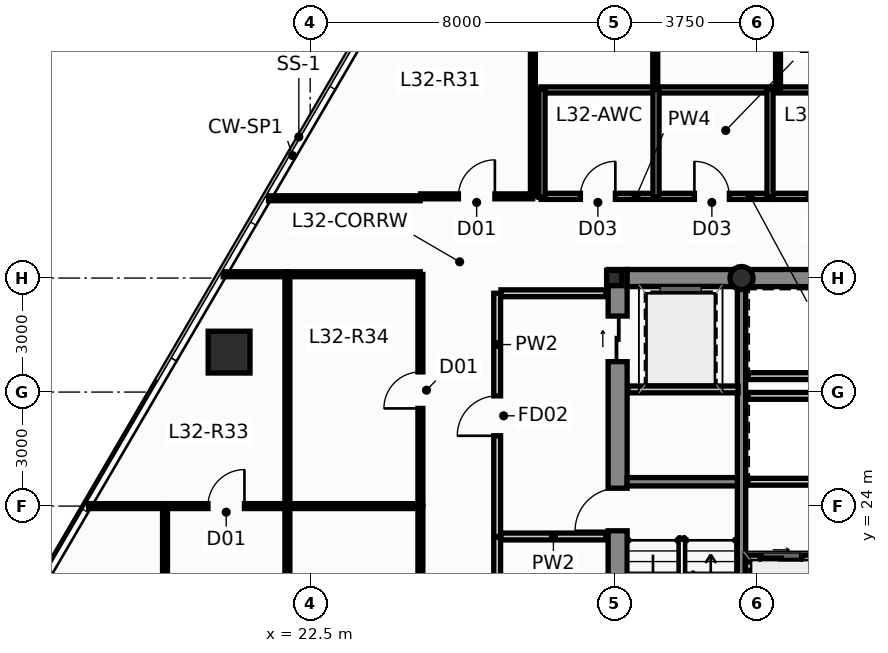
"""IFC4 building model, lengths in metres.
Left out: names, types, materials, properties, quantities, classifications, styles, units other than length and angle.
Written with IfcOpenShell. Run it as: python <this file> out.ifc"""

import sys

from ifc_helpers import new_model, si_unit, direction, frame, frame_2d, origin, origin_2d, place, context, subcontext, project, spatial, rectangle, hollow_rectangle, hollow_circle, i_section, extrude, source, transform, mapped, element, fill, save


model = new_model("IFC4")
c1 = context("Model", 3, precision=1e-05, world=origin(), true_north=direction((0.0, 1.0)))
c2 = subcontext(c1, "Body", "Model", "MODEL_VIEW")
j1 = project(units=[si_unit("LENGTHUNIT", "METRE"), si_unit("PLANEANGLEUNIT", "RADIAN")], contexts=[c1])
p1 = place(None, origin())
s1 = spatial("IfcSite", under=j1, at=p1, CompositionType="ELEMENT")
p2 = place(p1, origin())
s2 = spatial("IfcBuilding", under=s1, at=p2, CompositionType="ELEMENT")
p3 = place(p2, frame((0.0, 0.0, 123.65)))
s3 = spatial("IfcBuildingStorey", under=s2, at=p3, CompositionType="ELEMENT", Elevation=123.65)
m1 = source(origin(), c2, "Body", "SweptSolid", [
    extrude(i_section(OverallWidth=0.4, OverallDepth=0.4, WebThickness=0.02, FlangeThickness=0.032, at=origin_2d()), origin(), (0.0, 0.0, 1.0), 3.65),
])
p4 = place(p3, frame((30.5, 30.0, 0.0), z_axis=(0.0, 0.0, 1.0), x_axis=(1.0, 0.0, 0.0)))
e1 = element("IfcColumn", 1, at=p4, inside=s3, PredefinedType="COLUMN", context=c2, shape_type="MappedRepresentation", body=[
    mapped(m1, transform((0.0, 0.0, 0.0), scale=1.0)),
])
m2 = source(origin(), c2, "Body", "SweptSolid", [
    extrude(hollow_circle(Radius=0.305, WallThickness=0.025, at=origin_2d()), origin(), (0.0, 0.0, 1.0), 3.65),
])
p5 = place(p3, frame((33.85, 30.0, 0.0), z_axis=(0.0, 0.0, 1.0), x_axis=(1.0, 0.0, 0.0)))
e2 = element("IfcColumn", 2, at=p5, inside=s3, PredefinedType="COLUMN", context=c2, shape_type="MappedRepresentation", body=[
    mapped(m2, transform((0.0, 0.0, 0.0), scale=1.0)),
])
p6 = place(p3, frame((30.59, 16.95, 0.0), z_axis=(0.0, 0.0, 1.0), x_axis=(0.0, 1.0, 0.0)))
e3 = element("IfcWall", 3, at=p6, inside=s3, PredefinedType="SHEAR", context=c2, shape_type="SweptSolid", body=[
    extrude(rectangle(XDim=13.275, YDim=0.5, at=frame_2d((6.638, 0.0))), origin(), (0.0, 0.0, 1.0), 3.65),
])
p7 = place(p6, frame((6.4, 0.0, 0.0)))
e4 = element("IfcOpeningElement", 4, at=p7, cuts=e3, PredefinedType="OPENING", context=c2, shape_type="SweptSolid", body=[
    extrude(rectangle(XDim=1.12, YDim=2.15, at=frame_2d((0.56, 1.075))), frame((0.0, 0.262, 0.0), z_axis=(0.0, -1.0, 0.0), x_axis=(1.0, 0.0, 0.0)), (0.0, 0.0, 1.0), 0.524),
])
p8 = place(p6, frame((10.85, 0.0, 0.0)))
e5 = element("IfcOpeningElement", 5, at=p8, cuts=e3, PredefinedType="OPENING", context=c2, shape_type="SweptSolid", body=[
    extrude(rectangle(XDim=1.2, YDim=2.2, at=frame_2d((0.6, 1.1))), frame((0.0, 0.262, 0.0), z_axis=(0.0, -1.0, 0.0), x_axis=(1.0, 0.0, 0.0)), (0.0, 0.0, 1.0), 0.524),
])
p9 = place(p3, frame((30.84, 30.0, 0.0), z_axis=(0.0, 0.0, 1.0), x_axis=(1.0, 0.0, 0.0)))
e6 = element("IfcWall", 6, at=p9, inside=s3, PredefinedType="SHEAR", context=c2, shape_type="SweptSolid", body=[
    extrude(rectangle(XDim=2.9, YDim=0.45, at=frame_2d((1.45, 0.0))), origin(), (0.0, 0.0, 1.0), 3.65),
])
p10 = place(p3, frame((33.96, 30.0, 0.0), z_axis=(0.0, 0.0, 1.0), x_axis=(1.0, 0.0, 0.0)))
e7 = element("IfcWall", 7, at=p10, inside=s3, PredefinedType="SHEAR", context=c2, shape_type="SweptSolid", body=[
    extrude(rectangle(XDim=3.78, YDim=0.45, at=frame_2d((1.89, 0.0))), origin(), (0.0, 0.0, 1.0), 3.65),
])
p11 = place(p3, frame((33.85, 16.95, 0.0), z_axis=(0.0, 0.0, 1.0), x_axis=(0.0, 1.0, 0.0)))
e8 = element("IfcWall", 8, at=p11, inside=s3, PredefinedType="SHEAR", context=c2, shape_type="SweptSolid", body=[
    extrude(rectangle(XDim=13.275, YDim=0.22, at=frame_2d((6.638, 0.0))), origin(), (0.0, 0.0, 1.0), 3.65),
])
p12 = place(p3, frame((30.84, 24.64, 0.0), z_axis=(0.0, 0.0, 1.0), x_axis=(1.0, 0.0, 0.0)))
e9 = element("IfcWall", 9, at=p12, inside=s3, PredefinedType="SHEAR", context=c2, shape_type="SweptSolid", body=[
    extrude(rectangle(XDim=2.9, YDim=0.22, at=frame_2d((1.45, 0.0))), origin(), (0.0, 0.0, 1.0), 3.65),
])
m3 = source(origin(), c2, "Body", "SweptSolid", [
    extrude(hollow_rectangle(XDim=1.1, YDim=1.1, WallThickness=0.06, at=origin_2d()), origin(), (0.0, 0.0, 1.0), 3.651),
])
p13 = place(p3, frame((20.365, 28.051, 0.0), z_axis=(0.014912316331, -0.013775502979, 0.999793907933), x_axis=(0.678553674548, 0.734550822447, 0.0)))
e10 = element("IfcColumn", 10, at=p13, inside=s3, PredefinedType="COLUMN", context=c2, shape_type="MappedRepresentation", body=[
    mapped(m3, transform((0.0, 0.0, 0.0), scale=1.0)),
])
p14 = place(p3, frame((34.02, 22.62, 0.0), z_axis=(0.0, 0.0, 1.0), x_axis=(1.0, 0.0, 0.0)))
e11 = element("IfcWall", 11, at=p14, inside=s3, PredefinedType="PARTITIONING", context=c2, shape_type="SweptSolid", body=[
    extrude(rectangle(XDim=3.6, YDim=0.18, at=frame_2d((1.8, 0.0))), origin(), (0.0, 0.0, 1.0), 3.4),
])
p15 = place(p14, frame((0.32, 0.0, 0.0)))
e12 = element("IfcOpeningElement", 12, at=p15, cuts=e11, PredefinedType="OPENING", context=c2, shape_type="SweptSolid", body=[
    extrude(rectangle(XDim=1.1, YDim=2.2, at=frame_2d((0.55, 1.1))), frame((0.0, 0.102, 0.0), z_axis=(0.0, -1.0, 0.0), x_axis=(1.0, 0.0, 0.0)), (0.0, 0.0, 1.0), 0.204),
])
p16 = place(p14, frame((2.12, 0.0, 0.0)))
e13 = element("IfcOpeningElement", 13, at=p16, cuts=e11, PredefinedType="OPENING", context=c2, shape_type="SweptSolid", body=[
    extrude(rectangle(XDim=1.1, YDim=2.2, at=frame_2d((0.55, 1.1))), frame((0.0, 0.102, 0.0), z_axis=(0.0, -1.0, 0.0), x_axis=(1.0, 0.0, 0.0)), (0.0, 0.0, 1.0), 0.204),
])
p17 = place(p3, frame((34.02, 26.9, 0.0), z_axis=(0.0, 0.0, 1.0), x_axis=(1.0, 0.0, 0.0)))
e14 = element("IfcWall", 14, at=p17, inside=s3, PredefinedType="PARTITIONING", context=c2, shape_type="SweptSolid", body=[
    extrude(rectangle(XDim=3.6, YDim=0.18, at=frame_2d((1.8, 0.0))), origin(), (0.0, 0.0, 1.0), 3.4),
])
p18 = place(p3, frame((34.02, 24.64, 0.0), z_axis=(0.0, 0.0, 1.0), x_axis=(1.0, 0.0, 0.0)))
e15 = element("IfcWall", 15, at=p18, inside=s3, PredefinedType="PARTITIONING", context=c2, shape_type="SweptSolid", body=[
    extrude(rectangle(XDim=3.68, YDim=0.18, at=frame_2d((1.84, 0.0))), origin(), (0.0, 0.0, 1.0), 3.4),
])
p19 = place(p3, frame((34.02, 27.42, 0.0), z_axis=(0.0, 0.0, 1.0), x_axis=(1.0, 0.0, 0.0)))
e16 = element("IfcWall", 16, at=p19, inside=s3, PredefinedType="PARTITIONING", context=c2, shape_type="SweptSolid", body=[
    extrude(rectangle(XDim=3.66, YDim=0.18, at=frame_2d((1.83, 0.0))), origin(), (0.0, 0.0, 1.0), 3.4),
])
p20 = place(p3, frame((27.42, 23.2, 0.0), z_axis=(0.0, 0.0, 1.0), x_axis=(0.0, 1.0, 0.0)))
e17 = element("IfcWall", 17, at=p20, inside=s3, PredefinedType="PARTITIONING", context=c2, shape_type="SweptSolid", body=[
    extrude(rectangle(XDim=6.4, YDim=0.18, at=frame_2d((3.2, 0.0))), origin(), (0.0, 0.0, 1.0), 3.027),
])
p21 = place(p20, frame((2.65, 0.0, 0.0)))
e18 = element("IfcOpeningElement", 18, at=p21, cuts=e17, PredefinedType="OPENING", context=c2, shape_type="SweptSolid", body=[
    extrude(rectangle(XDim=1.05, YDim=2.15, at=frame_2d((0.525, 1.075))), frame((0.0, 0.102, 0.0), z_axis=(0.0, -1.0, 0.0), x_axis=(1.0, 0.0, 0.0)), (0.0, 0.0, 1.0), 0.204),
])
p22 = place(p3, frame((27.52, 23.2, 0.0), z_axis=(0.0, 0.0, 1.0), x_axis=(1.0, 0.0, 0.0)))
e19 = element("IfcWall", 19, at=p22, inside=s3, PredefinedType="PARTITIONING", context=c2, shape_type="SweptSolid", body=[
    extrude(rectangle(XDim=2.76, YDim=0.18, at=frame_2d((1.38, 0.0))), origin(), (0.0, 0.0, 1.0), 3.4),
])
p23 = place(p3, frame((27.52, 29.6, 0.0), z_axis=(0.0, 0.0, 1.0), x_axis=(1.0, 0.0, 0.0)))
e20 = element("IfcWall", 20, at=p23, inside=s3, PredefinedType="PARTITIONING", context=c2, shape_type="SweptSolid", body=[
    extrude(rectangle(XDim=2.76, YDim=0.18, at=frame_2d((1.38, 0.0))), origin(), (0.0, 0.0, 1.0), 2.783),
])
p24 = place(p3, frame((30.86, 27.07, 0.0), z_axis=(0.0, 0.0, 1.0), x_axis=(1.0, 0.0, 0.0)))
e21 = element("IfcWall", 21, at=p24, inside=s3, PredefinedType="PARTITIONING", context=c2, shape_type="SweptSolid", body=[
    extrude(rectangle(XDim=2.9, YDim=0.18, at=frame_2d((1.45, 0.0))), origin(), (0.0, 0.0, 1.0), 3.4),
])
p25 = place(p3, frame((27.42, 17.15, 0.0), z_axis=(0.0, 0.0, 1.0), x_axis=(0.0, 1.0, 0.0)))
e22 = element("IfcWall", 22, at=p25, inside=s3, PredefinedType="PARTITIONING", context=c2, shape_type="SweptSolid", body=[
    extrude(rectangle(XDim=6.03, YDim=0.18, at=frame_2d((3.015, 0.0))), origin(), (0.0, 0.0, 1.0), 3.027),
])
p26 = place(p25, frame((2.45, 0.0, 0.0)))
e23 = element("IfcOpeningElement", 23, at=p26, cuts=e22, PredefinedType="OPENING", context=c2, shape_type="SweptSolid", body=[
    extrude(rectangle(XDim=1.05, YDim=2.15, at=frame_2d((0.525, 1.075))), frame((0.0, 0.102, 0.0), z_axis=(0.0, -1.0, 0.0), x_axis=(1.0, 0.0, 0.0)), (0.0, 0.0, 1.0), 0.204),
])
p27 = place(p3, frame((28.575, 32.15, 0.0), z_axis=(0.0, 0.0, 1.0), x_axis=(1.0, 0.0, 0.0)))
e24 = element("IfcWall", 24, at=p27, inside=s3, PredefinedType="PLUMBINGWALL", context=c2, shape_type="SweptSolid", body=[
    extrude(rectangle(XDim=3.05, YDim=0.16, at=frame_2d((1.525, 0.0))), origin(), (0.0, 0.0, 1.0), 3.4),
])
p28 = place(p27, frame((1.035, 0.0, 0.0)))
e25 = element("IfcOpeningElement", 25, at=p28, cuts=e24, PredefinedType="OPENING", context=c2, shape_type="SweptSolid", body=[
    extrude(rectangle(XDim=0.92, YDim=2.1, at=frame_2d((0.46, 1.05))), frame((0.0, 0.092, 0.0), z_axis=(0.0, -1.0, 0.0), x_axis=(1.0, 0.0, 0.0)), (0.0, 0.0, 1.0), 0.184),
])
p29 = place(p3, frame((31.575, 32.15, 0.0), z_axis=(0.0, 0.0, 1.0), x_axis=(1.0, 0.0, 0.0)))
e26 = element("IfcWall", 26, at=p29, inside=s3, PredefinedType="PLUMBINGWALL", context=c2, shape_type="SweptSolid", body=[
    extrude(rectangle(XDim=3.05, YDim=0.16, at=frame_2d((1.525, 0.0))), origin(), (0.0, 0.0, 1.0), 3.4),
])
p30 = place(p29, frame((1.035, 0.0, 0.0)))
e27 = element("IfcOpeningElement", 27, at=p30, cuts=e26, PredefinedType="OPENING", context=c2, shape_type="SweptSolid", body=[
    extrude(rectangle(XDim=0.92, YDim=2.1, at=frame_2d((0.46, 1.05))), frame((0.0, 0.092, 0.0), z_axis=(0.0, -1.0, 0.0), x_axis=(1.0, 0.0, 0.0)), (0.0, 0.0, 1.0), 0.184),
])
p31 = place(p3, frame((34.575, 32.15, 0.0), z_axis=(0.0, 0.0, 1.0), x_axis=(1.0, 0.0, 0.0)))
e28 = element("IfcWall", 28, at=p31, inside=s3, PredefinedType="PLUMBINGWALL", context=c2, shape_type="SweptSolid", body=[
    extrude(rectangle(XDim=3.05, YDim=0.16, at=frame_2d((1.525, 0.0))), origin(), (0.0, 0.0, 1.0), 3.4),
])
p32 = place(p31, frame((1.035, 0.0, 0.0)))
e29 = element("IfcOpeningElement", 29, at=p32, cuts=e28, PredefinedType="OPENING", context=c2, shape_type="SweptSolid", body=[
    extrude(rectangle(XDim=0.92, YDim=2.1, at=frame_2d((0.46, 1.05))), frame((0.0, 0.092, 0.0), z_axis=(0.0, -1.0, 0.0), x_axis=(1.0, 0.0, 0.0)), (0.0, 0.0, 1.0), 0.184),
])
p33 = place(p3, frame((31.575, 34.95, 0.0), z_axis=(0.0, 0.0, 1.0), x_axis=(1.0, 0.0, 0.0)))
e30 = element("IfcWall", 30, at=p33, inside=s3, PredefinedType="PLUMBINGWALL", context=c2, shape_type="SweptSolid", body=[
    extrude(rectangle(XDim=3.05, YDim=0.16, at=frame_2d((1.525, 0.0))), origin(), (0.0, 0.0, 1.0), 3.027),
])
p34 = place(p3, frame((28.575, 34.95, 0.0), z_axis=(0.0, 0.0, 1.0), x_axis=(1.0, 0.0, 0.0)))
e31 = element("IfcWall", 31, at=p34, inside=s3, PredefinedType="PLUMBINGWALL", context=c2, shape_type="SweptSolid", body=[
    extrude(rectangle(XDim=3.03, YDim=0.16, at=frame_2d((1.515, 0.0))), origin(), (0.0, 0.0, 1.0), 3.027),
])
for number, where, z_axis, x_axis in (
    (32, (31.6, 32.125, 0.0), (0.0, 0.0, 1.0), (0.0, 1.0, 0.0)),
    (33, (28.6, 32.125, 0.0), (0.0, 0.0, 1.0), (0.0, 1.0, 0.0)),
    (34, (34.6, 32.125, 0.0), (0.0, 0.0, 1.0), (0.0, 1.0, 0.0)),
):
    element("IfcWall", number, at=place(p3, frame(where, z_axis=z_axis, x_axis=x_axis)), inside=s3, PredefinedType="PLUMBINGWALL", context=c2, shape_type="SweptSolid", body=[
        extrude(rectangle(XDim=2.85, YDim=0.16, at=frame_2d((1.425, 0.0))), origin(), (0.0, 0.0, 1.0), 3.4),
    ])
p35 = place(p3, frame((37.625, 34.95, 0.0), z_axis=(0.0, 0.0, 1.0), x_axis=(-1.0, 0.0, 0.0)))
e35 = element("IfcWall", 35, at=p35, inside=s3, PredefinedType="PLUMBINGWALL", context=c2, shape_type="SweptSolid", body=[
    extrude(rectangle(XDim=2.84, YDim=0.16, at=frame_2d((1.42, 0.0))), origin(), (0.0, 0.0, 1.0), 3.027),
])
p36 = place(p3, frame((34.81, 34.955, 0.0), z_axis=(0.0, 0.0, 1.0), x_axis=(0.0, 1.0, 0.0)))
e36 = element("IfcWall", 36, at=p36, inside=s3, PredefinedType="PARTITIONING", context=c2, shape_type="SweptSolid", body=[
    extrude(rectangle(XDim=16.477, YDim=0.13, at=frame_2d((8.238, 0.0))), origin(), (0.0, 0.0, 1.0), 3.4),
])
p37 = place(p36, frame((7.808, 0.0, 0.0)))
e37 = element("IfcOpeningElement", 37, at=p37, cuts=e36, PredefinedType="OPENING", context=c2, shape_type="SweptSolid", body=[
    extrude(rectangle(XDim=0.96, YDim=2.15, at=frame_2d((0.48, 1.075))), frame((0.0, 0.077, 0.0), z_axis=(0.0, -1.0, 0.0), x_axis=(1.0, 0.0, 0.0)), (0.0, 0.0, 1.0), 0.154),
])
p38 = place(p3, frame((31.58, 34.955, 0.0), z_axis=(0.0, 0.0, 1.0), x_axis=(0.0, 1.0, 0.0)))
e38 = element("IfcWall", 38, at=p38, inside=s3, PredefinedType="PARTITIONING", context=c2, shape_type="SweptSolid", body=[
    extrude(rectangle(XDim=14.602, YDim=0.13, at=frame_2d((7.301, 0.0))), origin(), (0.0, 0.0, 1.0), 2.783),
])
p39 = place(p38, frame((6.918, 0.0, 0.0)))
e39 = element("IfcOpeningElement", 39, at=p39, cuts=e38, PredefinedType="OPENING", context=c2, shape_type="SweptSolid", body=[
    extrude(rectangle(XDim=0.96, YDim=2.15, at=frame_2d((0.48, 1.075))), frame((0.0, 0.077, 0.0), z_axis=(0.0, -1.0, 0.0), x_axis=(1.0, 0.0, 0.0)), (0.0, 0.0, 1.0), 0.154),
])
p40 = place(p3, frame((28.36, 32.155, 0.0), z_axis=(0.0, 0.0, 1.0), x_axis=(0.0, 1.0, 0.0)))
e40 = element("IfcWall", 40, at=p40, inside=s3, PredefinedType="PARTITIONING", context=c2, shape_type="SweptSolid", body=[
    extrude(rectangle(XDim=11.892, YDim=0.13, at=frame_2d((5.946, 0.0))), origin(), (0.0, 0.0, 1.0), 3.4),
])
p41 = place(p3, frame((25.4, 17.105, 0.0), z_axis=(0.0, 0.0, 1.0), x_axis=(0.0, 1.0, 0.0)))
e41 = element("IfcWall", 41, at=p41, inside=s3, PredefinedType="PARTITIONING", context=c2, shape_type="SweptSolid", body=[
    extrude(rectangle(XDim=6.89, YDim=0.13, at=frame_2d((3.445, 0.0))), origin(), (0.0, 0.0, 1.0), 3.027),
])
p42 = place(p41, frame((2.965, 0.0, 0.0)))
e42 = element("IfcOpeningElement", 42, at=p42, cuts=e41, PredefinedType="OPENING", context=c2, shape_type="SweptSolid", body=[
    extrude(rectangle(XDim=0.96, YDim=2.15, at=frame_2d((0.48, 1.075))), frame((0.0, 0.077, 0.0), z_axis=(0.0, -1.0, 0.0), x_axis=(1.0, 0.0, 0.0)), (0.0, 0.0, 1.0), 0.154),
])
p43 = place(p3, frame((18.68, 17.105, 0.0), z_axis=(0.0, 0.0, 1.0), x_axis=(0.0, 1.0, 0.0)))
e43 = element("IfcWall", 43, at=p43, inside=s3, PredefinedType="PARTITIONING", context=c2, shape_type="SweptSolid", body=[
    extrude(rectangle(XDim=6.89, YDim=0.13, at=frame_2d((3.445, 0.0))), origin(), (0.0, 0.0, 1.0), 3.4),
])
p44 = place(p3, frame((21.9, 17.105, 0.0), z_axis=(0.0, 0.0, 1.0), x_axis=(0.0, 1.0, 0.0)))
e44 = element("IfcWall", 44, at=p44, inside=s3, PredefinedType="PARTITIONING", context=c2, shape_type="SweptSolid", body=[
    extrude(rectangle(XDim=6.89, YDim=0.13, at=frame_2d((3.445, 0.0))), origin(), (0.0, 0.0, 1.0), 3.027),
])
p45 = place(p3, frame((25.4, 24.005, 0.0), z_axis=(0.0, 0.0, 1.0), x_axis=(0.0, 1.0, 0.0)))
e45 = element("IfcWall", 45, at=p45, inside=s3, PredefinedType="PARTITIONING", context=c2, shape_type="SweptSolid", body=[
    extrude(rectangle(XDim=6.09, YDim=0.13, at=frame_2d((3.045, 0.0))), origin(), (0.0, 0.0, 1.0), 3.027),
])
p46 = place(p45, frame((2.565, 0.0, 0.0)))
e46 = element("IfcOpeningElement", 46, at=p46, cuts=e45, PredefinedType="OPENING", context=c2, shape_type="SweptSolid", body=[
    extrude(rectangle(XDim=0.96, YDim=2.15, at=frame_2d((0.48, 1.075))), frame((0.0, 0.077, 0.0), z_axis=(0.0, -1.0, 0.0), x_axis=(1.0, 0.0, 0.0)), (0.0, 0.0, 1.0), 0.154),
])
p47 = place(p3, frame((21.9, 24.005, 0.0), z_axis=(0.0, 0.0, 1.0), x_axis=(0.0, 1.0, 0.0)))
e47 = element("IfcWall", 47, at=p47, inside=s3, PredefinedType="PARTITIONING", context=c2, shape_type="SweptSolid", body=[
    extrude(rectangle(XDim=6.09, YDim=0.13, at=frame_2d((3.045, 0.0))), origin(), (0.0, 0.0, 1.0), 3.027),
])
p48 = place(p3, frame((25.395, 30.1, 0.0), z_axis=(0.0, 0.0, 1.0), x_axis=(-1.0, 0.0, 0.0)))
e48 = element("IfcWall", 48, at=p48, inside=s3, PredefinedType="PARTITIONING", context=c2, shape_type="SweptSolid", body=[
    extrude(rectangle(XDim=3.49, YDim=0.13, at=frame_2d((1.745, 0.0))), origin(), (0.0, 0.0, 1.0), 3.4),
])
p49 = place(p3, frame((21.405, 32.1, 0.0), z_axis=(0.0, 0.0, 1.0), x_axis=(1.0, 0.0, 0.0)))
e49 = element("IfcWall", 49, at=p49, inside=s3, PredefinedType="PARTITIONING", context=c2, shape_type="SweptSolid", body=[
    extrude(rectangle(XDim=3.99, YDim=0.13, at=frame_2d((1.995, 0.0))), origin(), (0.0, 0.0, 1.0), 3.4),
])
p50 = place(p3, frame((21.905, 24.0, 0.0), z_axis=(0.0, 0.0, 1.0), x_axis=(1.0, 0.0, 0.0)))
e50 = element("IfcWall", 50, at=p50, inside=s3, PredefinedType="PARTITIONING", context=c2, shape_type="SweptSolid", body=[
    extrude(rectangle(XDim=3.49, YDim=0.13, at=frame_2d((1.745, 0.0))), origin(), (0.0, 0.0, 1.0), 3.4),
])
p51 = place(p3, frame((18.685, 24.0, 0.0), z_axis=(0.0, 0.0, 1.0), x_axis=(1.0, 0.0, 0.0)))
e51 = element("IfcWall", 51, at=p51, inside=s3, PredefinedType="PARTITIONING", context=c2, shape_type="SweptSolid", body=[
    extrude(rectangle(XDim=3.21, YDim=0.13, at=frame_2d((1.605, 0.0))), origin(), (0.0, 0.0, 1.0), 3.4),
])
p52 = place(p51, frame((1.125, 0.0, 0.0)))
e52 = element("IfcOpeningElement", 52, at=p52, cuts=e51, PredefinedType="OPENING", context=c2, shape_type="SweptSolid", body=[
    extrude(rectangle(XDim=0.96, YDim=2.15, at=frame_2d((0.48, 1.075))), frame((0.0, 0.077, 0.0), z_axis=(0.0, -1.0, 0.0), x_axis=(1.0, 0.0, 0.0)), (0.0, 0.0, 1.0), 0.154),
])
p53 = place(p3, frame((25.405, 32.15, 0.0), z_axis=(0.0, 0.0, 1.0), x_axis=(1.0, 0.0, 0.0)))
e53 = element("IfcWall", 53, at=p53, inside=s3, PredefinedType="PARTITIONING", context=c2, shape_type="SweptSolid", body=[
    extrude(rectangle(XDim=2.95, YDim=0.13, at=frame_2d((1.475, 0.0))), origin(), (0.0, 0.0, 1.0), 3.4),
])
p54 = place(p53, frame((0.995, 0.0, 0.0)))
e54 = element("IfcOpeningElement", 54, at=p54, cuts=e53, PredefinedType="OPENING", context=c2, shape_type="SweptSolid", body=[
    extrude(rectangle(XDim=0.96, YDim=2.15, at=frame_2d((0.48, 1.075))), frame((0.0, 0.077, 0.0), z_axis=(0.0, -1.0, 0.0), x_axis=(1.0, 0.0, 0.0)), (0.0, 0.0, 1.0), 0.154),
])
p55 = place(p3, frame((16.672, 24.0, 0.0), z_axis=(0.0, 0.0, 1.0), x_axis=(1.0, 0.0, 0.0)))
e55 = element("IfcWall", 55, at=p55, inside=s3, PredefinedType="PARTITIONING", context=c2, shape_type="SweptSolid", body=[
    extrude(rectangle(XDim=2.003, YDim=0.13, at=frame_2d((1.002, 0.0))), origin(), (0.0, 0.0, 1.0), 3.4),
])
p56 = place(p3, frame((20.21, 30.1, 0.0), z_axis=(0.0, 0.0, 1.0), x_axis=(1.0, 0.0, 0.0)))
e56 = element("IfcWall", 56, at=p56, inside=s3, PredefinedType="PARTITIONING", context=c2, shape_type="SweptSolid", body=[
    extrude(rectangle(XDim=1.685, YDim=0.13, at=frame_2d((0.842, 0.0))), origin(), (0.0, 0.0, 1.0), 3.4),
])
p57 = place(p7, origin())
e57 = element("IfcDoor", 57, at=p57, inside=s3, OperationType="SINGLE_SWING_LEFT", PredefinedType="DOOR", context=c2, shape_type="SweptSolid", body=[
    extrude(rectangle(XDim=1.12, YDim=2.15, at=frame_2d((0.56, 1.075))), frame((0.0, 0.025, 0.0), z_axis=(0.0, -1.0, 0.0), x_axis=(1.0, 0.0, 0.0)), (0.0, 0.0, 1.0), 0.05),
])
fill(e4, e57)
p58 = place(p8, origin())
e58 = element("IfcDoor", 58, at=p58, inside=s3, OperationType="SLIDING_TO_LEFT", PredefinedType="DOOR", context=c2, shape_type="SweptSolid", body=[
    extrude(rectangle(XDim=1.2, YDim=2.2, at=frame_2d((0.6, 1.1))), frame((0.0, 0.025, 0.0), z_axis=(0.0, -1.0, 0.0), x_axis=(1.0, 0.0, 0.0)), (0.0, 0.0, 1.0), 0.05),
])
fill(e5, e58)
p59 = place(p15, origin())
e59 = element("IfcDoor", 59, at=p59, inside=s3, OperationType="SLIDING_TO_LEFT", PredefinedType="DOOR", context=c2, shape_type="SweptSolid", body=[
    extrude(rectangle(XDim=1.1, YDim=2.2, at=frame_2d((0.55, 1.1))), frame((0.0, 0.025, 0.0), z_axis=(0.0, -1.0, 0.0), x_axis=(1.0, 0.0, 0.0)), (0.0, 0.0, 1.0), 0.05),
])
fill(e12, e59)
p60 = place(p21, origin())
e60 = element("IfcDoor", 60, at=p60, inside=s3, OperationType="SINGLE_SWING_LEFT", PredefinedType="DOOR", context=c2, shape_type="SweptSolid", body=[
    extrude(rectangle(XDim=1.05, YDim=2.15, at=frame_2d((0.525, 1.075))), frame((0.0, 0.025, 0.0), z_axis=(0.0, -1.0, 0.0), x_axis=(1.0, 0.0, 0.0)), (0.0, 0.0, 1.0), 0.05),
])
fill(e18, e60)
p61 = place(p28, origin())
e61 = element("IfcDoor", 61, at=p61, inside=s3, OperationType="SINGLE_SWING_RIGHT", PredefinedType="DOOR", context=c2, shape_type="SweptSolid", body=[
    extrude(rectangle(XDim=0.92, YDim=2.1, at=frame_2d((0.46, 1.05))), frame((0.0, 0.025, 0.0), z_axis=(0.0, -1.0, 0.0), x_axis=(1.0, 0.0, 0.0)), (0.0, 0.0, 1.0), 0.05),
])
fill(e25, e61)
p62 = place(p30, origin())
e62 = element("IfcDoor", 62, at=p62, inside=s3, OperationType="SINGLE_SWING_LEFT", PredefinedType="DOOR", context=c2, shape_type="SweptSolid", body=[
    extrude(rectangle(XDim=0.92, YDim=2.1, at=frame_2d((0.46, 1.05))), frame((0.0, 0.025, 0.0), z_axis=(0.0, -1.0, 0.0), x_axis=(1.0, 0.0, 0.0)), (0.0, 0.0, 1.0), 0.05),
])
fill(e27, e62)
p63 = place(p46, origin())
e63 = element("IfcDoor", 63, at=p63, inside=s3, OperationType="SINGLE_SWING_LEFT", PredefinedType="DOOR", context=c2, shape_type="SweptSolid", body=[
    extrude(rectangle(XDim=0.96, YDim=2.15, at=frame_2d((0.48, 1.075))), frame((0.0, 0.025, 0.0), z_axis=(0.0, -1.0, 0.0), x_axis=(1.0, 0.0, 0.0)), (0.0, 0.0, 1.0), 0.05),
])
fill(e46, e63)
p64 = place(p52, origin())
e64 = element("IfcDoor", 64, at=p64, inside=s3, OperationType="SINGLE_SWING_RIGHT", PredefinedType="DOOR", context=c2, shape_type="SweptSolid", body=[
    extrude(rectangle(XDim=0.96, YDim=2.15, at=frame_2d((0.48, 1.075))), frame((0.0, 0.025, 0.0), z_axis=(0.0, -1.0, 0.0), x_axis=(1.0, 0.0, 0.0)), (0.0, 0.0, 1.0), 0.05),
])
fill(e52, e64)
p65 = place(p54, origin())
e65 = element("IfcDoor", 65, at=p65, inside=s3, OperationType="SINGLE_SWING_RIGHT", PredefinedType="DOOR", context=c2, shape_type="SweptSolid", body=[
    extrude(rectangle(XDim=0.96, YDim=2.15, at=frame_2d((0.48, 1.075))), frame((0.0, 0.025, 0.0), z_axis=(0.0, -1.0, 0.0), x_axis=(1.0, 0.0, 0.0)), (0.0, 0.0, 1.0), 0.05),
])
fill(e54, e65)
save(model, sys.argv[1])
